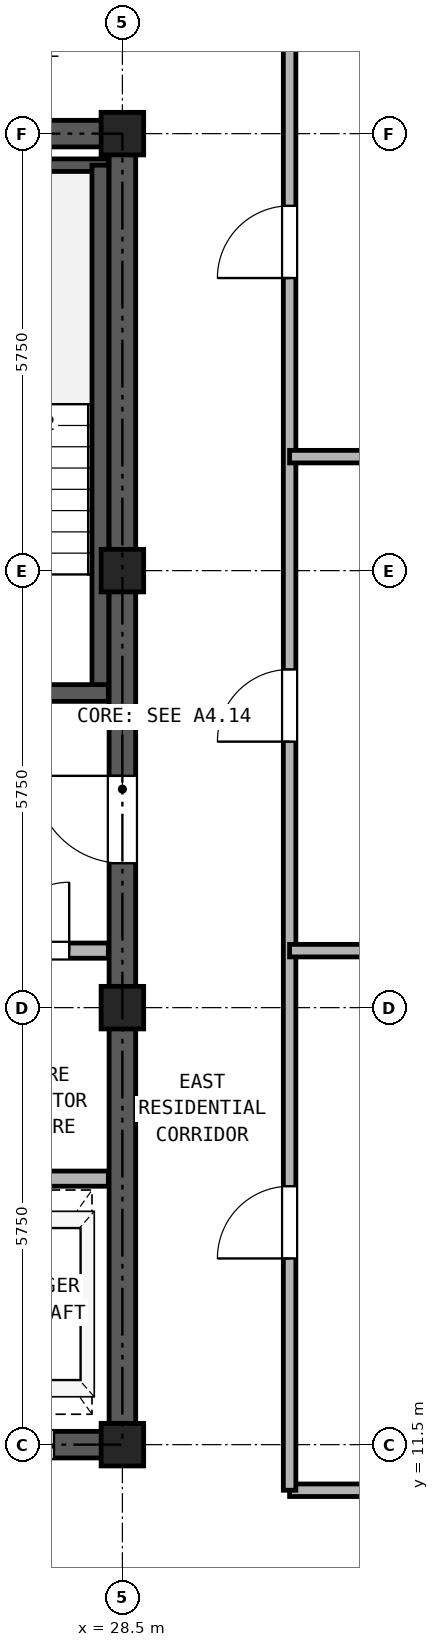
"""IFC4 building model, lengths in metres.
Left out: names, types, materials, properties, quantities, classifications, styles, units other than length and angle.
Written with IfcOpenShell. Run it as: python <this file> out.ifc"""

import sys

from ifc_helpers import new_model, si_unit, direction, frame, frame_2d, origin, origin_2d, place, context, subcontext, project, spatial, rectangle, hollow_rectangle, extrude, source, transform, mapped, element, fill, save


model = new_model("IFC4")
c1 = context("Model", 3, precision=1e-05, world=origin(), true_north=direction((0.0, 1.0)))
c2 = subcontext(c1, "Body", "Model", "MODEL_VIEW")
j1 = project(units=[si_unit("LENGTHUNIT", "METRE"), si_unit("PLANEANGLEUNIT", "RADIAN")], contexts=[c1])
p1 = place(None, origin())
s1 = spatial("IfcSite", under=j1, at=p1, CompositionType="ELEMENT")
p2 = place(p1, origin())
s2 = spatial("IfcBuilding", under=s1, at=p2, CompositionType="ELEMENT")
p3 = place(p2, frame((0.0, 0.0, 223.3)))
s3 = spatial("IfcBuildingStorey", under=s2, at=p3, CompositionType="ELEMENT", Elevation=223.3)
m1 = source(origin(), c2, "Body", "SweptSolid", [
    extrude(hollow_rectangle(XDim=0.56, YDim=0.56, WallThickness=0.03, at=origin_2d()), origin(), (0.0, 0.0, 1.0), 2.98),
])
for number, where, z_axis, x_axis in (
    (1, (28.5, 11.5, 0.0), (0.0, 0.0, 1.0), (1.0, 0.0, 0.0)),
    (2, (28.5, 17.25, 0.0), (0.0, 0.0, 1.0), (1.0, 0.0, 0.0)),
    (3, (28.5, 23.0, 0.0), (0.0, 0.0, 1.0), (1.0, 0.0, 0.0)),
    (4, (28.5, 28.75, 0.0), (0.0, 0.0, 1.0), (1.0, 0.0, 0.0)),
):
    element("IfcColumn", number, at=place(p3, frame(where, z_axis=z_axis, x_axis=x_axis)), inside=s3, PredefinedType="COLUMN", context=c2, shape_type="MappedRepresentation", body=[
        mapped(m1, transform((0.0, 0.0, 0.0), x_axis=(1.0, 0.0, 0.0), y_axis=(0.0, 1.0, 0.0), z_axis=(0.0, 0.0, 1.0), scale=1.0)),
    ])
p4 = place(p3, frame((18.325, 11.5, 0.0), z_axis=(0.0, 0.0, 1.0), x_axis=(1.0, 0.0, 0.0)))
e5 = element("IfcWall", 5, at=p4, inside=s3, PredefinedType="SHEAR", context=c2, shape_type="SweptSolid", body=[
    extrude(rectangle(XDim=10.35, YDim=0.35, at=frame_2d((5.175, 0.0))), origin(), (0.0, 0.0, 1.0), 2.98),
])
p5 = place(p4, frame((1.775, 0.0, 0.0)))
e6 = element("IfcOpeningElement", 6, at=p5, cuts=e5, PredefinedType="OPENING", context=c2, shape_type="SweptSolid", body=[
    extrude(rectangle(XDim=0.95, YDim=2.15, at=frame_2d((0.475, 1.075))), frame((0.0, 0.185, 0.0), z_axis=(0.0, -1.0, 0.0), x_axis=(1.0, 0.0, 0.0)), (0.0, 0.0, 1.0), 0.37),
])
p6 = place(p4, frame((5.275, 0.0, 0.0)))
e7 = element("IfcOpeningElement", 7, at=p6, cuts=e5, PredefinedType="OPENING", context=c2, shape_type="SweptSolid", body=[
    extrude(rectangle(XDim=0.95, YDim=2.15, at=frame_2d((0.475, 1.075))), frame((0.0, 0.185, 0.0), z_axis=(0.0, -1.0, 0.0), x_axis=(1.0, 0.0, 0.0)), (0.0, 0.0, 1.0), 0.37),
])
p7 = place(p4, frame((8.175, 0.0, 0.0)))
e8 = element("IfcOpeningElement", 8, at=p7, cuts=e5, PredefinedType="OPENING", context=c2, shape_type="SweptSolid", body=[
    extrude(rectangle(XDim=1.1, YDim=2.25, at=frame_2d((0.55, 1.125))), frame((0.0, 0.185, 0.0), z_axis=(0.0, -1.0, 0.0), x_axis=(1.0, 0.0, 0.0)), (0.0, 0.0, 1.0), 0.37),
])
p8 = place(p3, frame((18.325, 28.75, 0.0), z_axis=(0.0, 0.0, 1.0), x_axis=(1.0, 0.0, 0.0)))
e9 = element("IfcWall", 9, at=p8, inside=s3, PredefinedType="SHEAR", context=c2, shape_type="SweptSolid", body=[
    extrude(rectangle(XDim=10.35, YDim=0.35, at=frame_2d((5.175, 0.0))), origin(), (0.0, 0.0, 1.0), 2.98),
])
p9 = place(p8, frame((4.055, 0.0, 0.0)))
e10 = element("IfcOpeningElement", 10, at=p9, cuts=e9, PredefinedType="OPENING", context=c2, shape_type="SweptSolid", body=[
    extrude(rectangle(XDim=0.9, YDim=2.05, at=frame_2d((0.45, 1.025))), frame((0.0, 0.185, 0.0), z_axis=(0.0, -1.0, 0.0), x_axis=(1.0, 0.0, 0.0)), (0.0, 0.0, 1.0), 0.37),
])
p10 = place(p8, frame((5.595, 0.0, 0.0)))
e11 = element("IfcOpeningElement", 11, at=p10, cuts=e9, PredefinedType="OPENING", context=c2, shape_type="SweptSolid", body=[
    extrude(rectangle(XDim=0.9, YDim=2.05, at=frame_2d((0.45, 1.025))), frame((0.0, 0.185, 0.0), z_axis=(0.0, -1.0, 0.0), x_axis=(1.0, 0.0, 0.0)), (0.0, 0.0, 1.0), 0.37),
])
p11 = place(p3, frame((28.5, 11.675, 0.0), z_axis=(0.0, 0.0, 1.0), x_axis=(0.0, 1.0, 0.0)))
e12 = element("IfcWall", 12, at=p11, inside=s3, PredefinedType="SHEAR", context=c2, shape_type="SweptSolid", body=[
    extrude(rectangle(XDim=16.9, YDim=0.35, at=frame_2d((8.45, 0.0))), origin(), (0.0, 0.0, 1.0), 2.98),
])
p12 = place(p11, frame((7.475, 0.0, 0.0)))
e13 = element("IfcOpeningElement", 13, at=p12, cuts=e12, PredefinedType="OPENING", context=c2, shape_type="SweptSolid", body=[
    extrude(rectangle(XDim=1.15, YDim=2.2, at=frame_2d((0.575, 1.1))), frame((0.0, 0.185, 0.0), z_axis=(0.0, -1.0, 0.0), x_axis=(1.0, 0.0, 0.0)), (0.0, 0.0, 1.0), 0.37),
])
p13 = place(p3, frame((25.13, 28.335, 0.0), z_axis=(0.0, 0.0, 1.0), x_axis=(1.0, 0.0, 0.0)))
e14 = element("IfcWall", 14, at=p13, inside=s3, PredefinedType="PARTITIONING", context=c2, shape_type="SweptSolid", body=[
    extrude(rectangle(XDim=3.185, YDim=0.165, at=frame_2d((1.593, 0.0))), origin(), (0.0, 0.0, 1.0), 2.98),
])
p14 = place(p3, frame((28.21, 21.39, 0.0), z_axis=(0.0, 0.0, 1.0), x_axis=(0.0, 1.0, 0.0)))
e15 = element("IfcWall", 15, at=p14, inside=s3, PredefinedType="SOLIDWALL", context=c2, shape_type="SweptSolid", body=[
    extrude(rectangle(XDim=6.945, YDim=0.22, at=frame_2d((3.473, 0.0))), origin(), (0.0, 0.0, 1.0), 2.98),
])
p15 = place(p3, frame((25.13, 21.39, 0.0), z_axis=(0.0, 0.0, 1.0), x_axis=(1.0, 0.0, 0.0)))
e16 = element("IfcWall", 16, at=p15, inside=s3, PredefinedType="SOLIDWALL", context=c2, shape_type="SweptSolid", body=[
    extrude(rectangle(XDim=3.185, YDim=0.22, at=frame_2d((1.593, 0.0))), origin(), (0.0, 0.0, 1.0), 2.98),
])
p16 = place(p15, frame((0.92, 0.0, 0.0)))
e17 = element("IfcOpeningElement", 17, at=p16, cuts=e16, PredefinedType="OPENING", context=c2, shape_type="SweptSolid", body=[
    extrude(rectangle(XDim=1.15, YDim=2.2, at=frame_2d((0.575, 1.1))), frame((0.0, 0.12, 0.0), z_axis=(0.0, -1.0, 0.0), x_axis=(1.0, 0.0, 0.0)), (0.0, 0.0, 1.0), 0.24),
])
p17 = place(p3, frame((18.685, 18.0, 0.0), z_axis=(0.0, 0.0, 1.0), x_axis=(1.0, 0.0, 0.0)))
e18 = element("IfcWall", 18, at=p17, inside=s3, PredefinedType="PARTITIONING", context=c2, shape_type="SweptSolid", body=[
    extrude(rectangle(XDim=9.63, YDim=0.2, at=frame_2d((4.815, 0.0))), origin(), (0.0, 0.0, 1.0), 2.98),
])
p18 = place(p17, frame((0.565, 0.0, 0.0)))
e19 = element("IfcOpeningElement", 19, at=p18, cuts=e18, PredefinedType="OPENING", context=c2, shape_type="SweptSolid", body=[
    extrude(rectangle(XDim=1.3, YDim=2.3, at=frame_2d((0.65, 1.15))), frame((0.0, 0.11, 0.0), z_axis=(0.0, -1.0, 0.0), x_axis=(1.0, 0.0, 0.0)), (0.0, 0.0, 1.0), 0.22),
])
p19 = place(p17, frame((2.665, 0.0, 0.0)))
e20 = element("IfcOpeningElement", 20, at=p19, cuts=e18, PredefinedType="OPENING", context=c2, shape_type="SweptSolid", body=[
    extrude(rectangle(XDim=1.3, YDim=2.3, at=frame_2d((0.65, 1.15))), frame((0.0, 0.11, 0.0), z_axis=(0.0, -1.0, 0.0), x_axis=(1.0, 0.0, 0.0)), (0.0, 0.0, 1.0), 0.22),
])
p20 = place(p17, frame((5.085, 0.0, 0.0)))
e21 = element("IfcOpeningElement", 21, at=p20, cuts=e18, PredefinedType="OPENING", context=c2, shape_type="SweptSolid", body=[
    extrude(rectangle(XDim=0.9, YDim=2.05, at=frame_2d((0.45, 1.025))), frame((0.0, 0.11, 0.0), z_axis=(0.0, -1.0, 0.0), x_axis=(1.0, 0.0, 0.0)), (0.0, 0.0, 1.0), 0.22),
])
p21 = place(p17, frame((8.215, 0.0, 0.0)))
e22 = element("IfcOpeningElement", 22, at=p21, cuts=e18, PredefinedType="OPENING", context=c2, shape_type="SweptSolid", body=[
    extrude(rectangle(XDim=0.9, YDim=2.05, at=frame_2d((0.45, 1.025))), frame((0.0, 0.11, 0.0), z_axis=(0.0, -1.0, 0.0), x_axis=(1.0, 0.0, 0.0)), (0.0, 0.0, 1.0), 0.22),
])
p22 = place(p3, frame((18.685, 15.0, 0.0), z_axis=(0.0, 0.0, 1.0), x_axis=(1.0, 0.0, 0.0)))
e23 = element("IfcWall", 23, at=p22, inside=s3, PredefinedType="PARTITIONING", context=c2, shape_type="SweptSolid", body=[
    extrude(rectangle(XDim=9.63, YDim=0.2, at=frame_2d((4.815, 0.0))), origin(), (0.0, 0.0, 1.0), 2.98),
])
p23 = place(p3, frame((30.7, 10.9, 0.0), z_axis=(0.0, 0.0, 1.0), x_axis=(1.0, 0.0, 0.0)))
e24 = element("IfcWall", 24, at=p23, inside=s3, PredefinedType="PARTITIONING", context=c2, shape_type="SweptSolid", body=[
    extrude(rectangle(XDim=7.5, YDim=0.165, at=frame_2d((3.75, 0.0))), origin(), (0.0, 0.0, 1.0), 2.98),
])
p24 = place(p3, frame((30.7, 10.9, 0.0), z_axis=(0.0, 0.0, 1.0), x_axis=(0.0, 1.0, 0.0)))
e25 = element("IfcWall", 25, at=p24, inside=s3, PredefinedType="PARTITIONING", context=c2, shape_type="SweptSolid", body=[
    extrude(rectangle(XDim=24.24, YDim=0.165, at=frame_2d((12.12, 0.0))), origin(), (0.0, 0.0, 1.0), 2.98),
])
p25 = place(p24, frame((3.05, 0.0, 0.0)))
e26 = element("IfcOpeningElement", 26, at=p25, cuts=e25, PredefinedType="OPENING", context=c2, shape_type="SweptSolid", body=[
    extrude(rectangle(XDim=0.95, YDim=2.15, at=frame_2d((0.475, 1.075))), frame((0.0, 0.093, 0.0), z_axis=(0.0, -1.0, 0.0), x_axis=(1.0, 0.0, 0.0)), (0.0, 0.0, 1.0), 0.185),
])
p26 = place(p24, frame((9.85, 0.0, 0.0)))
e27 = element("IfcOpeningElement", 27, at=p26, cuts=e25, PredefinedType="OPENING", context=c2, shape_type="SweptSolid", body=[
    extrude(rectangle(XDim=0.95, YDim=2.15, at=frame_2d((0.475, 1.075))), frame((0.0, 0.093, 0.0), z_axis=(0.0, -1.0, 0.0), x_axis=(1.0, 0.0, 0.0)), (0.0, 0.0, 1.0), 0.185),
])
p27 = place(p24, frame((15.95, 0.0, 0.0)))
e28 = element("IfcOpeningElement", 28, at=p27, cuts=e25, PredefinedType="OPENING", context=c2, shape_type="SweptSolid", body=[
    extrude(rectangle(XDim=0.95, YDim=2.15, at=frame_2d((0.475, 1.075))), frame((0.0, 0.093, 0.0), z_axis=(0.0, -1.0, 0.0), x_axis=(1.0, 0.0, 0.0)), (0.0, 0.0, 1.0), 0.185),
])
p28 = place(p24, frame((21.27, 0.0, 0.0)))
e29 = element("IfcOpeningElement", 29, at=p28, cuts=e25, PredefinedType="OPENING", context=c2, shape_type="SweptSolid", body=[
    extrude(rectangle(XDim=0.95, YDim=2.15, at=frame_2d((0.475, 1.075))), frame((0.0, 0.093, 0.0), z_axis=(0.0, -1.0, 0.0), x_axis=(1.0, 0.0, 0.0)), (0.0, 0.0, 1.0), 0.185),
])
for number, where, z_axis, x_axis in (
    (30, (30.7, 18.0, 0.0), (0.0, 0.0, 1.0), (1.0, 0.0, 0.0)),
    (31, (30.7, 24.5, 0.0), (0.0, 0.0, 1.0), (1.0, 0.0, 0.0)),
):
    element("IfcWall", number, at=place(p3, frame(where, z_axis=z_axis, x_axis=x_axis)), inside=s3, PredefinedType="PARTITIONING", context=c2, shape_type="SweptSolid", body=[
        extrude(rectangle(XDim=10.94, YDim=0.165, at=frame_2d((5.47, 0.0))), origin(), (0.0, 0.0, 1.0), 2.98),
    ])
p29 = place(p21, frame((0.9, 0.0, 0.0), z_axis=(0.0, 0.0, 1.0), x_axis=(-1.0, 0.0, 0.0)))
e32 = element("IfcDoor", 32, at=p29, inside=s3, OperationType="SINGLE_SWING_RIGHT", PredefinedType="DOOR", context=c2, shape_type="SweptSolid", body=[
    extrude(rectangle(XDim=0.9, YDim=2.05, at=frame_2d((0.45, 1.025))), frame((0.0, 0.025, 0.0), z_axis=(0.0, -1.0, 0.0), x_axis=(1.0, 0.0, 0.0)), (0.0, 0.0, 1.0), 0.05),
])
fill(e22, e32)
p30 = place(p12, origin())
e33 = element("IfcDoor", 33, at=p30, inside=s3, OperationType="SINGLE_SWING_RIGHT", PredefinedType="DOOR", context=c2, shape_type="SweptSolid", body=[
    extrude(rectangle(XDim=1.15, YDim=2.2, at=frame_2d((0.575, 1.1))), frame((0.0, 0.025, 0.0), z_axis=(0.0, -1.0, 0.0), x_axis=(1.0, 0.0, 0.0)), (0.0, 0.0, 1.0), 0.05),
])
fill(e13, e33)
p31 = place(p7, frame((1.1, 0.0, 0.0), z_axis=(0.0, 0.0, 1.0), x_axis=(-1.0, 0.0, 0.0)))
e34 = element("IfcDoor", 34, at=p31, inside=s3, OperationType="DOUBLE_DOOR_SLIDING", PredefinedType="DOOR", context=c2, shape_type="SweptSolid", body=[
    extrude(rectangle(XDim=1.1, YDim=2.25, at=frame_2d((0.55, 1.125))), frame((0.0, 0.025, 0.0), z_axis=(0.0, -1.0, 0.0), x_axis=(1.0, 0.0, 0.0)), (0.0, 0.0, 1.0), 0.05),
])
fill(e8, e34)
p32 = place(p25, origin())
e35 = element("IfcDoor", 35, at=p32, inside=s3, OperationType="SINGLE_SWING_LEFT", PredefinedType="DOOR", context=c2, shape_type="SweptSolid", body=[
    extrude(rectangle(XDim=0.95, YDim=2.15, at=frame_2d((0.475, 1.075))), frame((0.0, 0.025, 0.0), z_axis=(0.0, -1.0, 0.0), x_axis=(1.0, 0.0, 0.0)), (0.0, 0.0, 1.0), 0.05),
])
fill(e26, e35)
p33 = place(p26, origin())
e36 = element("IfcDoor", 36, at=p33, inside=s3, OperationType="SINGLE_SWING_LEFT", PredefinedType="DOOR", context=c2, shape_type="SweptSolid", body=[
    extrude(rectangle(XDim=0.95, YDim=2.15, at=frame_2d((0.475, 1.075))), frame((0.0, 0.025, 0.0), z_axis=(0.0, -1.0, 0.0), x_axis=(1.0, 0.0, 0.0)), (0.0, 0.0, 1.0), 0.05),
])
fill(e27, e36)
p34 = place(p27, origin())
e37 = element("IfcDoor", 37, at=p34, inside=s3, OperationType="SINGLE_SWING_LEFT", PredefinedType="DOOR", context=c2, shape_type="SweptSolid", body=[
    extrude(rectangle(XDim=0.95, YDim=2.15, at=frame_2d((0.475, 1.075))), frame((0.0, 0.025, 0.0), z_axis=(0.0, -1.0, 0.0), x_axis=(1.0, 0.0, 0.0)), (0.0, 0.0, 1.0), 0.05),
])
fill(e28, e37)
save(model, sys.argv[1])
